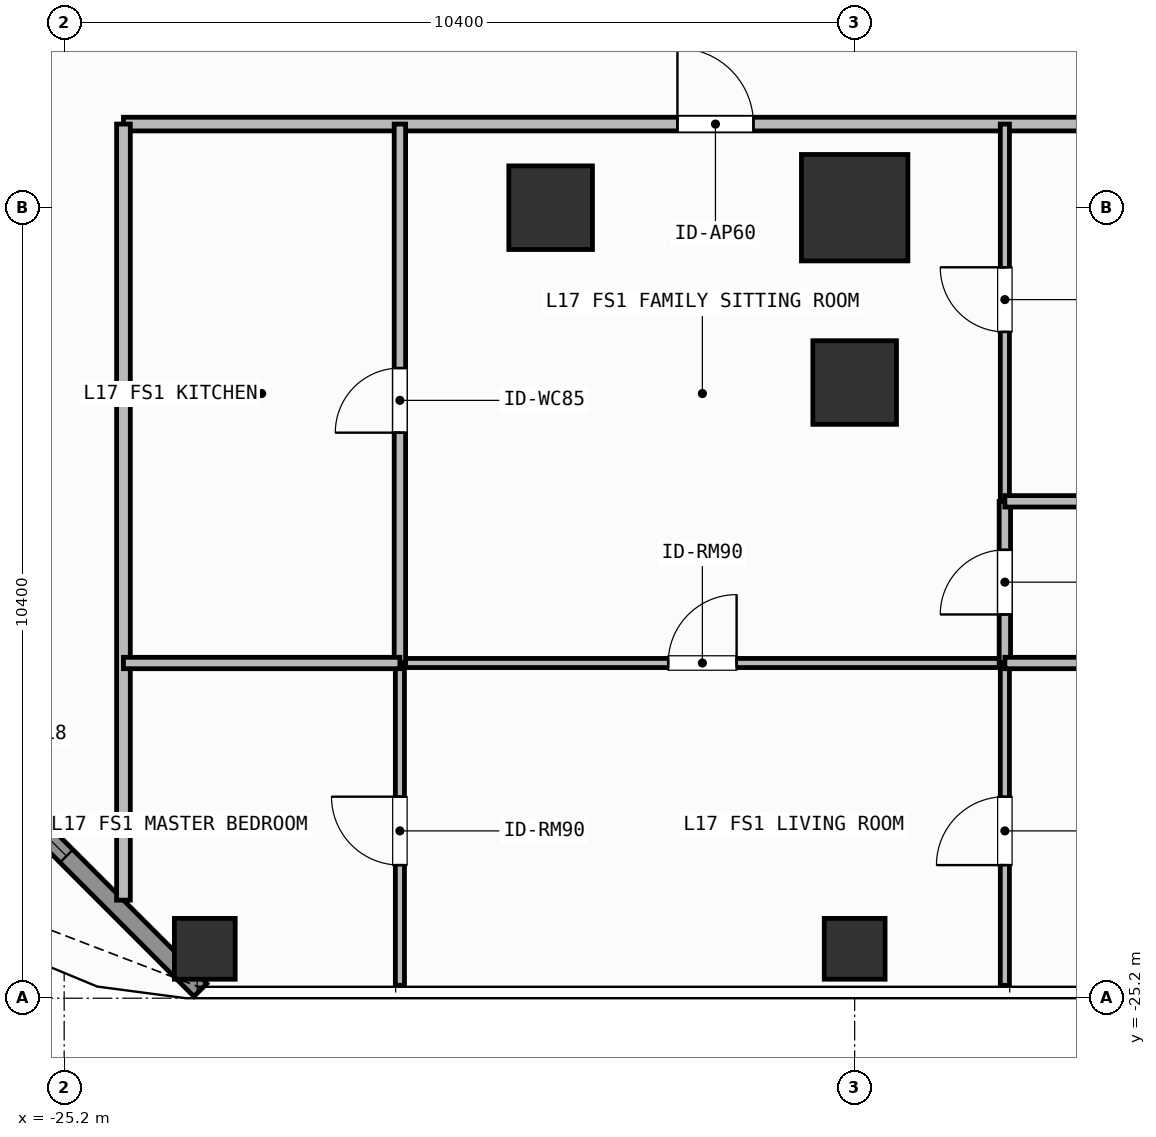
"""IFC4 building model, lengths in metres.
Left out: names, types, materials, properties, quantities, classifications, styles, units other than length and angle.
Written with IfcOpenShell. Run it as: python <this file> out.ifc"""

import sys

from ifc_helpers import new_model, si_unit, direction, frame, frame_2d, origin, origin_2d, place, context, subcontext, project, spatial, rectangle, hollow_rectangle, extrude, element, fill, save


model = new_model("IFC4")
c1 = context("Model", 3, precision=1e-05, world=origin(), true_north=direction((0.0, 1.0)))
c2 = subcontext(c1, "Body", "Model", "MODEL_VIEW")
j1 = project(units=[si_unit("LENGTHUNIT", "METRE"), si_unit("PLANEANGLEUNIT", "RADIAN")], contexts=[c1])
p1 = place(None, origin())
s1 = spatial("IfcSite", under=j1, at=p1, CompositionType="ELEMENT")
p2 = place(p1, origin())
s2 = spatial("IfcBuilding", under=s1, at=p2, CompositionType="ELEMENT")
p3 = place(p2, frame((0.0, 0.0, 65.7)))
s3 = spatial("IfcBuildingStorey", under=s2, at=p3, CompositionType="ELEMENT", Elevation=65.7)
p4 = place(p3, frame((-14.8, -14.8, 0.0), z_axis=(0.0, 0.0, 1.0), x_axis=(1.0, 0.0, 0.0)))
e1 = element("IfcColumn", 1, at=p4, inside=s3, PredefinedType="COLUMN", context=c2, shape_type="SweptSolid", body=[
    extrude(rectangle(XDim=1.4, YDim=1.4, at=origin_2d()), origin(), (0.0, 0.0, 1.0), 3.9),
])
for number, where, z_axis, x_axis in (
    (2, (-18.8, -14.8, 0.0), (0.0, 0.0, 1.0), (1.0, 0.0, 0.0)),
    (3, (-14.8, -17.1, 0.0), (0.0, 0.0, 1.0), (1.0, 0.0, 0.0)),
):
    element("IfcColumn", number, at=place(p3, frame(where, z_axis=z_axis, x_axis=x_axis)), inside=s3, PredefinedType="COLUMN", context=c2, shape_type="SweptSolid", body=[
        extrude(rectangle(XDim=1.1, YDim=1.1, at=origin_2d()), origin(), (0.0, 0.0, 1.0), 3.9),
    ])
for number, where, z_axis, x_axis in (
    (4, (-23.35, -24.55, 0.0), (0.0, 0.0, 1.0), (1.0, 0.0, 0.0)),
    (5, (-14.8, -24.55, 0.0), (0.0, 0.0, 1.0), (1.0, 0.0, 0.0)),
):
    element("IfcColumn", number, at=place(p3, frame(where, z_axis=z_axis, x_axis=x_axis)), inside=s3, PredefinedType="COLUMN", context=c2, shape_type="SweptSolid", body=[
        extrude(hollow_rectangle(XDim=0.8, YDim=0.8, WallThickness=0.036, at=origin_2d()), origin(), (0.0, 0.0, 1.0), 3.9),
    ])
p5 = place(p3, frame((-23.408, -25.092, 0.0), z_axis=(0.0, 0.0, 1.0), x_axis=(-0.707106781187, 0.707106781187, 0.0)))
e6 = element("IfcWall", 6, at=p5, inside=s3, PredefinedType="SOLIDWALL", context=c2, shape_type="SweptSolid", body=[
    extrude(rectangle(XDim=6.484, YDim=0.24, at=frame_2d((3.242, 0.0))), origin(), (0.0, 0.0, 1.0), 3.68),
])
p6 = place(p5, frame((2.492, 0.0, 0.8)))
e7 = element("IfcOpeningElement", 7, at=p6, cuts=e6, PredefinedType="OPENING", context=c2, shape_type="SweptSolid", body=[
    extrude(rectangle(XDim=1.5, YDim=1.85, at=frame_2d((0.75, 0.925))), frame((0.0, 0.13, 0.0), z_axis=(0.0, -1.0, 0.0), x_axis=(1.0, 0.0, 0.0)), (0.0, 0.0, 1.0), 0.26),
])
p7 = place(p3, frame((-24.42, -13.7, 0.0), z_axis=(0.0, 0.0, 1.0), x_axis=(1.0, 0.0, 0.0)))
e8 = element("IfcWall", 8, at=p7, inside=s3, PredefinedType="PARTITIONING", context=c2, shape_type="SweptSolid", body=[
    extrude(rectangle(XDim=17.359, YDim=0.18, at=frame_2d((8.679, 0.0))), origin(), (0.0, 0.0, 1.0), 3.68),
])
p8 = place(p7, frame((7.288, 0.0, 0.0)))
e9 = element("IfcOpeningElement", 9, at=p8, cuts=e8, PredefinedType="OPENING", context=c2, shape_type="SweptSolid", body=[
    extrude(rectangle(XDim=1.0, YDim=2.2, at=frame_2d((0.5, 1.1))), frame((0.0, 0.1, 0.0), z_axis=(0.0, -1.0, 0.0), x_axis=(1.0, 0.0, 0.0)), (0.0, 0.0, 1.0), 0.2),
])
p9 = place(p3, frame((-20.783, -20.79, 0.0), z_axis=(0.0, 0.0, 1.0), x_axis=(1.0, 0.0, 0.0)))
e10 = element("IfcWall", 10, at=p9, inside=s3, PredefinedType="PARTITIONING", context=c2, shape_type="SweptSolid", body=[
    extrude(rectangle(XDim=7.959, YDim=0.12, at=frame_2d((3.979, 0.0))), origin(), (0.0, 0.0, 1.0), 3.68),
])
p10 = place(p9, frame((3.53, 0.0, 0.0)))
e11 = element("IfcOpeningElement", 11, at=p10, cuts=e10, PredefinedType="OPENING", context=c2, shape_type="SweptSolid", body=[
    extrude(rectangle(XDim=0.9, YDim=2.1, at=frame_2d((0.45, 1.05))), frame((0.0, 0.07, 0.0), z_axis=(0.0, -1.0, 0.0), x_axis=(1.0, 0.0, 0.0)), (0.0, 0.0, 1.0), 0.14),
])
p11 = place(p3, frame((-20.783, -20.79, 0.0), z_axis=(0.0, 0.0, 1.0), x_axis=(0.0, 1.0, 0.0)))
e12 = element("IfcWall", 12, at=p11, inside=s3, PredefinedType="PARTITIONING", context=c2, shape_type="SweptSolid", body=[
    extrude(rectangle(XDim=7.09, YDim=0.15, at=frame_2d((3.545, 0.0))), origin(), (0.0, 0.0, 1.0), 3.68),
])
p12 = place(p11, frame((3.03, 0.0, 0.0)))
e13 = element("IfcOpeningElement", 13, at=p12, cuts=e12, PredefinedType="OPENING", context=c2, shape_type="SweptSolid", body=[
    extrude(rectangle(XDim=0.85, YDim=2.1, at=frame_2d((0.425, 1.05))), frame((0.0, 0.085, 0.0), z_axis=(0.0, -1.0, 0.0), x_axis=(1.0, 0.0, 0.0)), (0.0, 0.0, 1.0), 0.17),
])
p13 = place(p3, frame((-20.783, -25.03, 0.0), z_axis=(0.0, 0.0, 1.0), x_axis=(0.0, 1.0, 0.0)))
e14 = element("IfcWall", 14, at=p13, inside=s3, PredefinedType="PARTITIONING", context=c2, shape_type="SweptSolid", body=[
    extrude(rectangle(XDim=4.24, YDim=0.12, at=frame_2d((2.12, 0.0))), origin(), (0.0, 0.0, 1.0), 3.68),
])
p14 = place(p13, frame((1.581, 0.0, 0.0)))
e15 = element("IfcOpeningElement", 15, at=p14, cuts=e14, PredefinedType="OPENING", context=c2, shape_type="SweptSolid", body=[
    extrude(rectangle(XDim=0.9, YDim=2.1, at=frame_2d((0.45, 1.05))), frame((0.0, 0.07, 0.0), z_axis=(0.0, -1.0, 0.0), x_axis=(1.0, 0.0, 0.0)), (0.0, 0.0, 1.0), 0.14),
])
p15 = place(p3, frame((-12.824, -20.79, 0.0), z_axis=(0.0, 0.0, 1.0), x_axis=(0.0, 1.0, 0.0)))
e16 = element("IfcWall", 16, at=p15, inside=s3, PredefinedType="PARTITIONING", context=c2, shape_type="SweptSolid", body=[
    extrude(rectangle(XDim=2.127, YDim=0.15, at=frame_2d((1.063, 0.0))), origin(), (0.0, 0.0, 1.0), 3.68),
])
p16 = place(p15, frame((0.638, 0.0, 0.0)))
e17 = element("IfcOpeningElement", 17, at=p16, cuts=e16, PredefinedType="OPENING", context=c2, shape_type="SweptSolid", body=[
    extrude(rectangle(XDim=0.85, YDim=2.1, at=frame_2d((0.425, 1.05))), frame((0.0, 0.085, 0.0), z_axis=(0.0, -1.0, 0.0), x_axis=(1.0, 0.0, 0.0)), (0.0, 0.0, 1.0), 0.17),
])
p17 = place(p3, frame((-12.824, -18.663, 0.0), z_axis=(0.0, 0.0, 1.0), x_axis=(0.0, 1.0, 0.0)))
e18 = element("IfcWall", 18, at=p17, inside=s3, PredefinedType="PARTITIONING", context=c2, shape_type="SweptSolid", body=[
    extrude(rectangle(XDim=4.963, YDim=0.12, at=frame_2d((2.481, 0.0))), origin(), (0.0, 0.0, 1.0), 3.68),
])
p18 = place(p17, frame((2.229, 0.0, 0.0)))
e19 = element("IfcOpeningElement", 19, at=p18, cuts=e18, PredefinedType="OPENING", context=c2, shape_type="SweptSolid", body=[
    extrude(rectangle(XDim=0.85, YDim=2.1, at=frame_2d((0.425, 1.05))), frame((0.0, 0.07, 0.0), z_axis=(0.0, -1.0, 0.0), x_axis=(1.0, 0.0, 0.0)), (0.0, 0.0, 1.0), 0.14),
])
p19 = place(p3, frame((-12.824, -25.03, 0.0), z_axis=(0.0, 0.0, 1.0), x_axis=(0.0, 1.0, 0.0)))
e20 = element("IfcWall", 20, at=p19, inside=s3, PredefinedType="PARTITIONING", context=c2, shape_type="SweptSolid", body=[
    extrude(rectangle(XDim=4.24, YDim=0.12, at=frame_2d((2.12, 0.0))), origin(), (0.0, 0.0, 1.0), 3.68),
])
p20 = place(p19, frame((1.581, 0.0, 0.0)))
e21 = element("IfcOpeningElement", 21, at=p20, cuts=e20, PredefinedType="OPENING", context=c2, shape_type="SweptSolid", body=[
    extrude(rectangle(XDim=0.9, YDim=2.1, at=frame_2d((0.45, 1.05))), frame((0.0, 0.07, 0.0), z_axis=(0.0, -1.0, 0.0), x_axis=(1.0, 0.0, 0.0)), (0.0, 0.0, 1.0), 0.14),
])
p21 = place(p3, frame((-24.42, -23.91, 0.0), z_axis=(0.0, 0.0, 1.0), x_axis=(0.0, 1.0, 0.0)))
e22 = element("IfcWall", 22, at=p21, inside=s3, PredefinedType="PARTITIONING", context=c2, shape_type="SweptSolid", body=[
    extrude(rectangle(XDim=10.21, YDim=0.18, at=frame_2d((5.105, 0.0))), origin(), (0.0, 0.0, 1.0), 3.68),
])
p22 = place(p3, frame((-24.42, -20.79, 0.0), z_axis=(0.0, 0.0, 1.0), x_axis=(1.0, 0.0, 0.0)))
e23 = element("IfcWall", 23, at=p22, inside=s3, PredefinedType="PARTITIONING", context=c2, shape_type="SweptSolid", body=[
    extrude(rectangle(XDim=3.637, YDim=0.15, at=frame_2d((1.818, 0.0))), origin(), (0.0, 0.0, 1.0), 3.68),
])
for number, where, z_axis, x_axis in (
    (24, (-12.824, -18.663, 0.0), (0.0, 0.0, 1.0), (1.0, 0.0, 0.0)),
    (25, (-12.824, -20.79, 0.0), (0.0, 0.0, 1.0), (1.0, 0.0, 0.0)),
):
    element("IfcWall", number, at=place(p3, frame(where, z_axis=z_axis, x_axis=x_axis)), inside=s3, PredefinedType="PARTITIONING", context=c2, shape_type="SweptSolid", body=[
        extrude(rectangle(XDim=5.763, YDim=0.15, at=frame_2d((2.881, 0.0))), origin(), (0.0, 0.0, 1.0), 3.68),
    ])
p23 = place(p6, origin())
e26 = element("IfcWindow", 26, at=p23, inside=s3, PartitioningType="SINGLE_PANEL", PredefinedType="WINDOW", context=c2, shape_type="SweptSolid", body=[
    extrude(rectangle(XDim=1.5, YDim=1.85, at=frame_2d((0.75, 0.925))), frame((0.0, 0.03, 0.0), z_axis=(0.0, -1.0, 0.0), x_axis=(1.0, 0.0, 0.0)), (0.0, 0.0, 1.0), 0.06),
])
fill(e7, e26)
p24 = place(p8, origin())
e27 = element("IfcDoor", 27, at=p24, inside=s3, OperationType="SINGLE_SWING_LEFT", PredefinedType="DOOR", context=c2, shape_type="SweptSolid", body=[
    extrude(rectangle(XDim=1.0, YDim=2.2, at=frame_2d((0.5, 1.1))), frame((0.0, 0.025, 0.0), z_axis=(0.0, -1.0, 0.0), x_axis=(1.0, 0.0, 0.0)), (0.0, 0.0, 1.0), 0.05),
])
fill(e9, e27)
p25 = place(p10, origin())
e28 = element("IfcDoor", 28, at=p25, inside=s3, OperationType="SINGLE_SWING_RIGHT", PredefinedType="DOOR", context=c2, shape_type="SweptSolid", body=[
    extrude(rectangle(XDim=0.9, YDim=2.1, at=frame_2d((0.45, 1.05))), frame((0.0, 0.025, 0.0), z_axis=(0.0, -1.0, 0.0), x_axis=(1.0, 0.0, 0.0)), (0.0, 0.0, 1.0), 0.05),
])
fill(e11, e28)
p26 = place(p12, origin())
e29 = element("IfcDoor", 29, at=p26, inside=s3, OperationType="SINGLE_SWING_LEFT", PredefinedType="DOOR", context=c2, shape_type="SweptSolid", body=[
    extrude(rectangle(XDim=0.85, YDim=2.1, at=frame_2d((0.425, 1.05))), frame((0.0, 0.025, 0.0), z_axis=(0.0, -1.0, 0.0), x_axis=(1.0, 0.0, 0.0)), (0.0, 0.0, 1.0), 0.05),
])
fill(e13, e29)
p27 = place(p14, origin())
e30 = element("IfcDoor", 30, at=p27, inside=s3, OperationType="SINGLE_SWING_RIGHT", PredefinedType="DOOR", context=c2, shape_type="SweptSolid", body=[
    extrude(rectangle(XDim=0.9, YDim=2.1, at=frame_2d((0.45, 1.05))), frame((0.0, 0.025, 0.0), z_axis=(0.0, -1.0, 0.0), x_axis=(1.0, 0.0, 0.0)), (0.0, 0.0, 1.0), 0.05),
])
fill(e15, e30)
p28 = place(p16, origin())
e31 = element("IfcDoor", 31, at=p28, inside=s3, OperationType="SINGLE_SWING_LEFT", PredefinedType="DOOR", context=c2, shape_type="SweptSolid", body=[
    extrude(rectangle(XDim=0.85, YDim=2.1, at=frame_2d((0.425, 1.05))), frame((0.0, 0.025, 0.0), z_axis=(0.0, -1.0, 0.0), x_axis=(1.0, 0.0, 0.0)), (0.0, 0.0, 1.0), 0.05),
])
fill(e17, e31)
p29 = place(p18, origin())
e32 = element("IfcDoor", 32, at=p29, inside=s3, OperationType="SINGLE_SWING_RIGHT", PredefinedType="DOOR", context=c2, shape_type="SweptSolid", body=[
    extrude(rectangle(XDim=0.85, YDim=2.1, at=frame_2d((0.425, 1.05))), frame((0.0, 0.025, 0.0), z_axis=(0.0, -1.0, 0.0), x_axis=(1.0, 0.0, 0.0)), (0.0, 0.0, 1.0), 0.05),
])
fill(e19, e32)
p30 = place(p20, origin())
e33 = element("IfcDoor", 33, at=p30, inside=s3, OperationType="SINGLE_SWING_LEFT", PredefinedType="DOOR", context=c2, shape_type="SweptSolid", body=[
    extrude(rectangle(XDim=0.9, YDim=2.1, at=frame_2d((0.45, 1.05))), frame((0.0, 0.025, 0.0), z_axis=(0.0, -1.0, 0.0), x_axis=(1.0, 0.0, 0.0)), (0.0, 0.0, 1.0), 0.05),
])
fill(e21, e33)
save(model, sys.argv[1])
